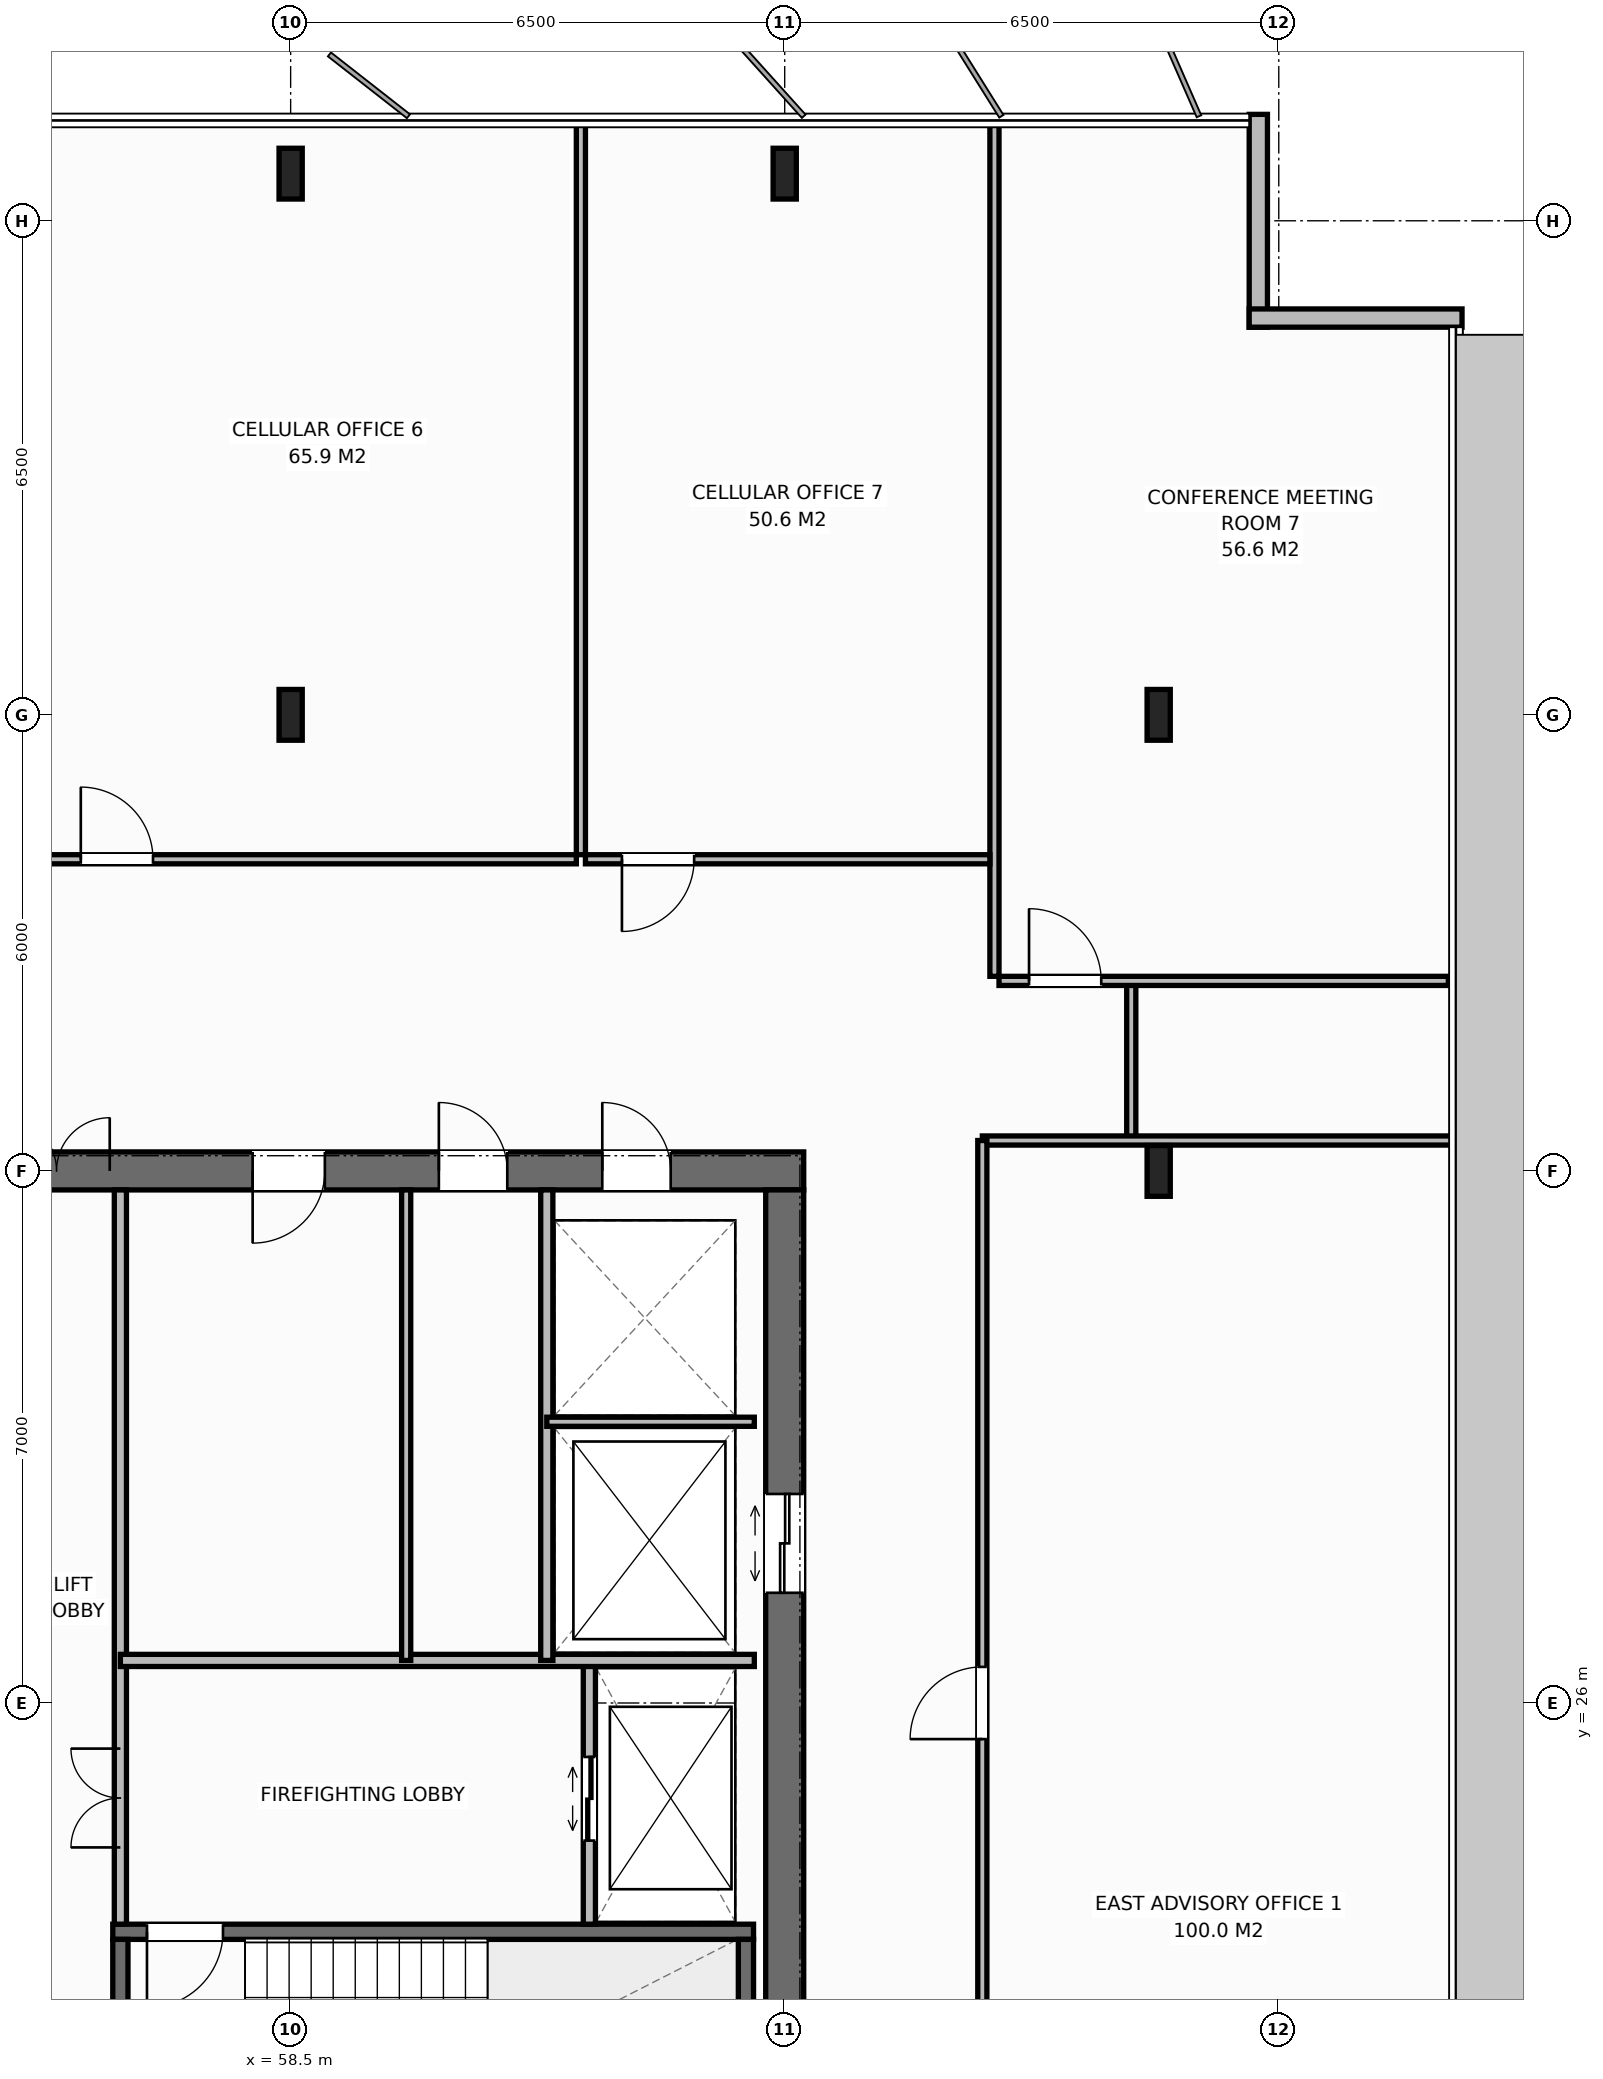
"""IFC4 building model, lengths in metres.
Left out: names, types, materials, properties, quantities, classifications, styles, units other than length and angle.
Written with IfcOpenShell. Run it as: python <this file> out.ifc"""

import sys

from ifc_helpers import new_model, si_unit, direction, frame, frame_2d, origin, origin_2d, place, context, subcontext, project, spatial, rectangle, i_section, extrude, element, fill, save


model = new_model("IFC4")
c1 = context("Model", 3, precision=1e-05, world=origin(), true_north=direction((0.0, 1.0)))
c2 = subcontext(c1, "Body", "Model", "MODEL_VIEW")
j1 = project(units=[si_unit("LENGTHUNIT", "METRE"), si_unit("PLANEANGLEUNIT", "RADIAN")], contexts=[c1])
p1 = place(None, origin())
s1 = spatial("IfcSite", under=j1, at=p1, CompositionType="ELEMENT")
p2 = place(p1, origin())
s2 = spatial("IfcBuilding", under=s1, at=p2, CompositionType="ELEMENT")
p3 = place(p2, frame((0.0, 0.0, 298.4)))
s3 = spatial("IfcBuildingStorey", under=s2, at=p3, CompositionType="ELEMENT", Elevation=298.4)
p4 = place(p3, frame((51.75, 33.0, 0.0), z_axis=(0.0, 0.0, 1.0), x_axis=(1.0, 0.0, 0.0)))
e1 = element("IfcWall", 1, at=p4, inside=s3, PredefinedType="SHEAR", context=c2, shape_type="SweptSolid", body=[
    extrude(rectangle(XDim=13.5, YDim=0.5, at=frame_2d((6.75, 0.0))), origin(), (0.0, 0.0, 1.0), 4.0),
])
p5 = place(p4, frame((2.97, 0.0, 0.0)))
e2 = element("IfcOpeningElement", 2, at=p5, cuts=e1, PredefinedType="OPENING", context=c2, shape_type="SweptSolid", body=[
    extrude(rectangle(XDim=1.4, YDim=2.2, at=frame_2d((0.7, 1.1))), frame((0.0, 0.26, 0.0), z_axis=(0.0, -1.0, 0.0), x_axis=(1.0, 0.0, 0.0)), (0.0, 0.0, 1.0), 0.52),
])
p6 = place(p4, frame((10.85, 0.0, 0.0)))
e3 = element("IfcOpeningElement", 3, at=p6, cuts=e1, PredefinedType="OPENING", context=c2, shape_type="SweptSolid", body=[
    extrude(rectangle(XDim=0.9, YDim=2.15, at=frame_2d((0.45, 1.075))), frame((0.0, 0.26, 0.0), z_axis=(0.0, -1.0, 0.0), x_axis=(1.0, 0.0, 0.0)), (0.0, 0.0, 1.0), 0.52),
])
p7 = place(p4, frame((6.25, 0.0, 0.0)))
e4 = element("IfcOpeningElement", 4, at=p7, cuts=e1, PredefinedType="OPENING", context=c2, shape_type="SweptSolid", body=[
    extrude(rectangle(XDim=0.95, YDim=2.15, at=frame_2d((0.475, 1.075))), frame((0.0, 0.26, 0.0), z_axis=(0.0, -1.0, 0.0), x_axis=(1.0, 0.0, 0.0)), (0.0, 0.0, 1.0), 0.52),
])
p8 = place(p4, frame((8.7, 0.0, 0.0)))
e5 = element("IfcOpeningElement", 5, at=p8, cuts=e1, PredefinedType="OPENING", context=c2, shape_type="SweptSolid", body=[
    extrude(rectangle(XDim=0.9, YDim=2.15, at=frame_2d((0.45, 1.075))), frame((0.0, 0.26, 0.0), z_axis=(0.0, -1.0, 0.0), x_axis=(1.0, 0.0, 0.0)), (0.0, 0.0, 1.0), 0.52),
])
p9 = place(p3, frame((65.0, 19.25, 0.0), z_axis=(0.0, 0.0, 1.0), x_axis=(0.0, 1.0, 0.0)))
e6 = element("IfcWall", 6, at=p9, inside=s3, PredefinedType="SHEAR", context=c2, shape_type="SweptSolid", body=[
    extrude(rectangle(XDim=13.5, YDim=0.5, at=frame_2d((6.75, 0.0))), origin(), (0.0, 0.0, 1.0), 4.0),
])
p10 = place(p9, frame((8.2, 0.0, 0.0)))
e7 = element("IfcOpeningElement", 7, at=p10, cuts=e6, PredefinedType="OPENING", context=c2, shape_type="SweptSolid", body=[
    extrude(rectangle(XDim=1.3, YDim=2.2, at=frame_2d((0.65, 1.1))), frame((0.0, 0.26, 0.0), z_axis=(0.0, -1.0, 0.0), x_axis=(1.0, 0.0, 0.0)), (0.0, 0.0, 1.0), 0.52),
])
p11 = place(p3, frame((56.16, 22.99, 0.0), z_axis=(0.0, 0.0, 1.0), x_axis=(1.0, 0.0, 0.0)))
e8 = element("IfcWall", 8, at=p11, inside=s3, PredefinedType="SHEAR", context=c2, shape_type="SweptSolid", body=[
    extrude(rectangle(XDim=8.43, YDim=0.2, at=frame_2d((4.215, 0.0))), origin(), (0.0, 0.0, 1.0), 4.0),
])
p12 = place(p11, frame((0.45, 0.0, 0.0)))
e9 = element("IfcOpeningElement", 9, at=p12, cuts=e8, PredefinedType="OPENING", context=c2, shape_type="SweptSolid", body=[
    extrude(rectangle(XDim=1.0, YDim=2.15, at=frame_2d((0.5, 1.075))), frame((0.0, 0.11, 0.0), z_axis=(0.0, -1.0, 0.0), x_axis=(1.0, 0.0, 0.0)), (0.0, 0.0, 1.0), 0.22),
])
for number, where, z_axis, x_axis in (
    (10, (56.26, 19.61, 0.0), (0.0, 0.0, 1.0), (0.0, 1.0, 0.0)),
    (11, (64.49, 19.61, 0.0), (0.0, 0.0, 1.0), (0.0, 1.0, 0.0)),
):
    element("IfcWall", number, at=place(p3, frame(where, z_axis=z_axis, x_axis=x_axis)), inside=s3, PredefinedType="SHEAR", context=c2, shape_type="SweptSolid", body=[
        extrude(rectangle(XDim=3.28, YDim=0.2, at=frame_2d((1.64, 0.0))), origin(), (0.0, 0.0, 1.0), 4.0),
    ])
for number, where, z_axis, x_axis in (
    (12, (58.5, 39.0, 0.0), (0.0, 0.0, 1.0), (1.0, 0.0, 0.0)),
    (13, (58.5, 46.12, 0.0), (0.0, 0.0, 1.0), (1.0, 0.0, 0.0)),
    (14, (65.0, 46.12, 0.0), (0.0, 0.0, 1.0), (1.0, 0.0, 0.0)),
    (15, (69.92, 33.0, 0.0), (0.0, 0.0, 1.0), (1.0, 0.0, 0.0)),
    (16, (69.92, 39.0, 0.0), (0.0, 0.0, 1.0), (1.0, 0.0, 0.0)),
):
    element("IfcColumn", number, at=place(p3, frame(where, z_axis=z_axis, x_axis=x_axis)), inside=s3, PredefinedType="COLUMN", context=c2, shape_type="SweptSolid", body=[
        extrude(i_section(OverallWidth=0.305, OverallDepth=0.668, WebThickness=0.021, FlangeThickness=0.04, at=origin_2d()), origin(), (0.0, 0.0, 1.0), 4.0),
    ])
for number, where, z_axis, x_axis in (
    (17, (71.231, 46.9, 0.0), (0.0, 0.0, 1.0), (0.0, -1.0, 0.0)),
    (18, (71.111, 44.22, 0.0), (0.0, 0.0, 1.0), (1.0, 0.0, 0.0)),
):
    element("IfcWall", number, at=place(p3, frame(where, z_axis=z_axis, x_axis=x_axis)), inside=s3, PredefinedType="STANDARD", context=c2, shape_type="SweptSolid", body=[
        extrude(rectangle(XDim=2.8, YDim=0.24, at=frame_2d((1.4, 0.0))), origin(), (0.0, 0.0, 1.0), 3.788),
    ])
p13 = place(p3, frame((56.26, 23.09, 0.0), z_axis=(0.0, 0.0, 1.0), x_axis=(0.0, 1.0, 0.0)))
e19 = element("IfcWall", 19, at=p13, inside=s3, PredefinedType="STANDARD", context=c2, shape_type="SweptSolid", body=[
    extrude(rectangle(XDim=9.66, YDim=0.16, at=frame_2d((4.83, 0.0))), origin(), (0.0, 0.0, 1.0), 3.788),
])
p14 = place(p13, frame((1.01, 0.0, 0.0)))
e20 = element("IfcOpeningElement", 20, at=p14, cuts=e19, PredefinedType="OPENING", context=c2, shape_type="SweptSolid", body=[
    extrude(rectangle(XDim=1.3, YDim=2.2, at=frame_2d((0.65, 1.1))), frame((0.0, 0.09, 0.0), z_axis=(0.0, -1.0, 0.0), x_axis=(1.0, 0.0, 0.0)), (0.0, 0.0, 1.0), 0.18),
])
p15 = place(p3, frame((62.43, 23.09, 0.0), z_axis=(0.0, 0.0, 1.0), x_axis=(0.0, 1.0, 0.0)))
e21 = element("IfcWall", 21, at=p15, inside=s3, PredefinedType="STANDARD", context=c2, shape_type="SweptSolid", body=[
    extrude(rectangle(XDim=3.47, YDim=0.16, at=frame_2d((1.735, 0.0))), origin(), (0.0, 0.0, 1.0), 3.788),
])
p16 = place(p15, frame((1.1, 0.0, 0.0)))
e22 = element("IfcOpeningElement", 22, at=p16, cuts=e21, PredefinedType="OPENING", context=c2, shape_type="SweptSolid", body=[
    extrude(rectangle(XDim=1.1, YDim=2.2, at=frame_2d((0.55, 1.1))), frame((0.0, 0.09, 0.0), z_axis=(0.0, -1.0, 0.0), x_axis=(1.0, 0.0, 0.0)), (0.0, 0.0, 1.0), 0.18),
])
p17 = place(p3, frame((56.26, 26.56, 0.0), z_axis=(0.0, 0.0, 1.0), x_axis=(1.0, 0.0, 0.0)))
e23 = element("IfcWall", 23, at=p17, inside=s3, PredefinedType="STANDARD", context=c2, shape_type="SweptSolid", body=[
    extrude(rectangle(XDim=8.34, YDim=0.16, at=frame_2d((4.17, 0.0))), origin(), (0.0, 0.0, 1.0), 3.788),
])
p18 = place(p3, frame((61.87, 26.56, 0.0), z_axis=(0.0, 0.0, 1.0), x_axis=(0.0, 1.0, 0.0)))
e24 = element("IfcWall", 24, at=p18, inside=s3, PredefinedType="STANDARD", context=c2, shape_type="SweptSolid", body=[
    extrude(rectangle(XDim=6.19, YDim=0.16, at=frame_2d((3.095, 0.0))), origin(), (0.0, 0.0, 1.0), 3.788),
])
p19 = place(p3, frame((61.87, 29.7, 0.0), z_axis=(0.0, 0.0, 1.0), x_axis=(1.0, 0.0, 0.0)))
e25 = element("IfcWall", 25, at=p19, inside=s3, PredefinedType="PARTITIONING", context=c2, shape_type="SweptSolid", body=[
    extrude(rectangle(XDim=2.73, YDim=0.12, at=frame_2d((1.365, 0.0))), origin(), (0.0, 0.0, 1.0), 3.788),
])
p20 = place(p3, frame((60.02, 26.56, 0.0), z_axis=(0.0, 0.0, 1.0), x_axis=(0.0, 1.0, 0.0)))
e26 = element("IfcWall", 26, at=p20, inside=s3, PredefinedType="PARTITIONING", context=c2, shape_type="SweptSolid", body=[
    extrude(rectangle(XDim=6.19, YDim=0.12, at=frame_2d((3.095, 0.0))), origin(), (0.0, 0.0, 1.0), 3.788),
])
p21 = place(p3, frame((69.559, 33.4, 0.0), z_axis=(0.0, 0.0, 1.0), x_axis=(0.0, 1.0, 0.0)))
e27 = element("IfcWall", 27, at=p21, inside=s3, PredefinedType="PARTITIONING", context=c2, shape_type="SweptSolid", body=[
    extrude(rectangle(XDim=2.1, YDim=0.12, at=frame_2d((1.05, 0.0))), origin(), (0.0, 0.0, 1.0), 3.788),
])
p22 = place(p3, frame((62.319, 37.16, 0.0), z_axis=(0.0, 0.0, 1.0), x_axis=(0.0, 1.0, 0.0)))
e28 = element("IfcWall", 28, at=p22, inside=s3, PredefinedType="PARTITIONING", context=c2, shape_type="SweptSolid", body=[
    extrude(rectangle(XDim=9.72, YDim=0.12, at=frame_2d((4.86, 0.0))), origin(), (0.0, 0.0, 1.0), 3.788),
])
p23 = place(p3, frame((55.259, 37.1, 0.0), z_axis=(0.0, 0.0, 1.0), x_axis=(1.0, 0.0, 0.0)))
e29 = element("IfcWall", 29, at=p23, inside=s3, PredefinedType="PARTITIONING", context=c2, shape_type="SweptSolid", body=[
    extrude(rectangle(XDim=6.999, YDim=0.12, at=frame_2d((3.5, 0.0))), origin(), (0.0, 0.0, 1.0), 3.788),
])
p24 = place(p23, frame((0.48, 0.0, 0.0)))
e30 = element("IfcOpeningElement", 30, at=p24, cuts=e29, PredefinedType="OPENING", context=c2, shape_type="SweptSolid", body=[
    extrude(rectangle(XDim=0.95, YDim=2.15, at=frame_2d((0.475, 1.075))), frame((0.0, 0.07, 0.0), z_axis=(0.0, -1.0, 0.0), x_axis=(1.0, 0.0, 0.0)), (0.0, 0.0, 1.0), 0.14),
])
p25 = place(p3, frame((67.76, 35.56, 0.0), z_axis=(0.0, 0.0, 1.0), x_axis=(0.0, 1.0, 0.0)))
e31 = element("IfcWall", 31, at=p25, inside=s3, PredefinedType="PARTITIONING", context=c2, shape_type="SweptSolid", body=[
    extrude(rectangle(XDim=11.32, YDim=0.12, at=frame_2d((5.66, 0.0))), origin(), (0.0, 0.0, 1.0), 3.788),
])
p26 = place(p3, frame((62.379, 37.1, 0.0), z_axis=(0.0, 0.0, 1.0), x_axis=(1.0, 0.0, 0.0)))
e32 = element("IfcWall", 32, at=p26, inside=s3, PredefinedType="PARTITIONING", context=c2, shape_type="SweptSolid", body=[
    extrude(rectangle(XDim=5.321, YDim=0.12, at=frame_2d((2.66, 0.0))), origin(), (0.0, 0.0, 1.0), 3.788),
])
p27 = place(p26, frame((0.48, 0.0, 0.0)))
e33 = element("IfcOpeningElement", 33, at=p27, cuts=e32, PredefinedType="OPENING", context=c2, shape_type="SweptSolid", body=[
    extrude(rectangle(XDim=0.95, YDim=2.15, at=frame_2d((0.475, 1.075))), frame((0.0, 0.07, 0.0), z_axis=(0.0, -1.0, 0.0), x_axis=(1.0, 0.0, 0.0)), (0.0, 0.0, 1.0), 0.14),
])
p28 = place(p3, frame((67.819, 35.5, 0.0), z_axis=(0.0, 0.0, 1.0), x_axis=(1.0, 0.0, 0.0)))
e34 = element("IfcWall", 34, at=p28, inside=s3, PredefinedType="PARTITIONING", context=c2, shape_type="SweptSolid", body=[
    extrude(rectangle(XDim=5.912, YDim=0.12, at=frame_2d((2.956, 0.0))), origin(), (0.0, 0.0, 1.0), 3.788),
])
p29 = place(p28, frame((0.395, 0.0, 0.0)))
e35 = element("IfcOpeningElement", 35, at=p29, cuts=e34, PredefinedType="OPENING", context=c2, shape_type="SweptSolid", body=[
    extrude(rectangle(XDim=0.95, YDim=2.15, at=frame_2d((0.475, 1.075))), frame((0.0, 0.07, 0.0), z_axis=(0.0, -1.0, 0.0), x_axis=(1.0, 0.0, 0.0)), (0.0, 0.0, 1.0), 0.14),
])
p30 = place(p3, frame((67.6, 33.4, 0.0), z_axis=(0.0, 0.0, 1.0), x_axis=(1.0, 0.0, 0.0)))
e36 = element("IfcWall", 36, at=p30, inside=s3, PredefinedType="PARTITIONING", context=c2, shape_type="SweptSolid", body=[
    extrude(rectangle(XDim=6.291, YDim=0.12, at=frame_2d((3.146, 0.0))), origin(), (0.0, 0.0, 1.0), 3.788),
])
p31 = place(p3, frame((67.6, 16.5, 0.0), z_axis=(0.0, 0.0, 1.0), x_axis=(0.0, 1.0, 0.0)))
e37 = element("IfcWall", 37, at=p31, inside=s3, PredefinedType="PARTITIONING", context=c2, shape_type="SweptSolid", body=[
    extrude(rectangle(XDim=16.9, YDim=0.12, at=frame_2d((8.45, 0.0))), origin(), (0.0, 0.0, 1.0), 3.788),
])
p32 = place(p31, frame((9.025, 0.0, 0.0)))
e38 = element("IfcOpeningElement", 38, at=p32, cuts=e37, PredefinedType="OPENING", context=c2, shape_type="SweptSolid", body=[
    extrude(rectangle(XDim=0.95, YDim=2.15, at=frame_2d((0.475, 1.075))), frame((0.0, 0.07, 0.0), z_axis=(0.0, -1.0, 0.0), x_axis=(1.0, 0.0, 0.0)), (0.0, 0.0, 1.0), 0.14),
])
p33 = place(p5, origin())
e39 = element("IfcDoor", 39, at=p33, inside=s3, OperationType="DOUBLE_DOOR_SINGLE_SWING", PredefinedType="DOOR", context=c2, shape_type="SweptSolid", body=[
    extrude(rectangle(XDim=1.4, YDim=2.2, at=frame_2d((0.7, 1.1))), frame((0.0, -0.025, 0.0), z_axis=(0.0, -1.0, 0.0), x_axis=(1.0, 0.0, 0.0)), (0.0, 0.0, 1.0), 0.05),
])
fill(e2, e39)
p34 = place(p12, origin())
e40 = element("IfcDoor", 40, at=p34, inside=s3, OperationType="SINGLE_SWING_RIGHT", PredefinedType="DOOR", context=c2, shape_type="SweptSolid", body=[
    extrude(rectangle(XDim=1.0, YDim=2.15, at=frame_2d((0.5, 1.075))), frame((0.0, 0.025, 0.0), z_axis=(0.0, -1.0, 0.0), x_axis=(1.0, 0.0, 0.0)), (0.0, 0.0, 1.0), 0.05),
])
fill(e9, e40)
p35 = place(p16, origin())
e41 = element("IfcDoor", 41, at=p35, inside=s3, OperationType="DOUBLE_DOOR_SLIDING", PredefinedType="DOOR", context=c2, shape_type="SweptSolid", body=[
    extrude(rectangle(XDim=1.1, YDim=2.2, at=frame_2d((0.55, 1.1))), frame((0.0, 0.025, 0.0), z_axis=(0.0, -1.0, 0.0), x_axis=(1.0, 0.0, 0.0)), (0.0, 0.0, 1.0), 0.05),
])
fill(e22, e41)
p36 = place(p14, origin())
e42 = element("IfcDoor", 42, at=p36, inside=s3, OperationType="DOUBLE_DOOR_SINGLE_SWING", PredefinedType="DOOR", context=c2, shape_type="SweptSolid", body=[
    extrude(rectangle(XDim=1.3, YDim=2.2, at=frame_2d((0.65, 1.1))), frame((0.0, 0.025, 0.0), z_axis=(0.0, -1.0, 0.0), x_axis=(1.0, 0.0, 0.0)), (0.0, 0.0, 1.0), 0.05),
])
fill(e20, e42)
p37 = place(p10, origin())
e43 = element("IfcDoor", 43, at=p37, inside=s3, OperationType="DOUBLE_DOOR_SLIDING", PredefinedType="DOOR", context=c2, shape_type="SweptSolid", body=[
    extrude(rectangle(XDim=1.3, YDim=2.2, at=frame_2d((0.65, 1.1))), frame((0.0, 0.025, 0.0), z_axis=(0.0, -1.0, 0.0), x_axis=(1.0, 0.0, 0.0)), (0.0, 0.0, 1.0), 0.05),
])
fill(e7, e43)
p38 = place(p6, origin())
e44 = element("IfcDoor", 44, at=p38, inside=s3, OperationType="SINGLE_SWING_LEFT", PredefinedType="DOOR", context=c2, shape_type="SweptSolid", body=[
    extrude(rectangle(XDim=0.9, YDim=2.15, at=frame_2d((0.45, 1.075))), frame((0.0, -0.025, 0.0), z_axis=(0.0, -1.0, 0.0), x_axis=(1.0, 0.0, 0.0)), (0.0, 0.0, 1.0), 0.05),
])
fill(e3, e44)
p39 = place(p7, origin())
e45 = element("IfcDoor", 45, at=p39, inside=s3, OperationType="SINGLE_SWING_RIGHT", PredefinedType="DOOR", context=c2, shape_type="SweptSolid", body=[
    extrude(rectangle(XDim=0.95, YDim=2.15, at=frame_2d((0.475, 1.075))), frame((0.0, -0.025, 0.0), z_axis=(0.0, -1.0, 0.0), x_axis=(1.0, 0.0, 0.0)), (0.0, 0.0, 1.0), 0.05),
])
fill(e4, e45)
p40 = place(p8, origin())
e46 = element("IfcDoor", 46, at=p40, inside=s3, OperationType="SINGLE_SWING_LEFT", PredefinedType="DOOR", context=c2, shape_type="SweptSolid", body=[
    extrude(rectangle(XDim=0.9, YDim=2.15, at=frame_2d((0.45, 1.075))), frame((0.0, -0.025, 0.0), z_axis=(0.0, -1.0, 0.0), x_axis=(1.0, 0.0, 0.0)), (0.0, 0.0, 1.0), 0.05),
])
fill(e5, e46)
p41 = place(p24, origin())
e47 = element("IfcDoor", 47, at=p41, inside=s3, OperationType="SINGLE_SWING_LEFT", PredefinedType="DOOR", context=c2, shape_type="SweptSolid", body=[
    extrude(rectangle(XDim=0.95, YDim=2.15, at=frame_2d((0.475, 1.075))), frame((0.0, 0.025, 0.0), z_axis=(0.0, -1.0, 0.0), x_axis=(1.0, 0.0, 0.0)), (0.0, 0.0, 1.0), 0.05),
])
fill(e30, e47)
p42 = place(p27, origin())
e48 = element("IfcDoor", 48, at=p42, inside=s3, OperationType="SINGLE_SWING_RIGHT", PredefinedType="DOOR", context=c2, shape_type="SweptSolid", body=[
    extrude(rectangle(XDim=0.95, YDim=2.15, at=frame_2d((0.475, 1.075))), frame((0.0, 0.025, 0.0), z_axis=(0.0, -1.0, 0.0), x_axis=(1.0, 0.0, 0.0)), (0.0, 0.0, 1.0), 0.05),
])
fill(e33, e48)
p43 = place(p29, origin())
e49 = element("IfcDoor", 49, at=p43, inside=s3, OperationType="SINGLE_SWING_LEFT", PredefinedType="DOOR", context=c2, shape_type="SweptSolid", body=[
    extrude(rectangle(XDim=0.95, YDim=2.15, at=frame_2d((0.475, 1.075))), frame((0.0, 0.025, 0.0), z_axis=(0.0, -1.0, 0.0), x_axis=(1.0, 0.0, 0.0)), (0.0, 0.0, 1.0), 0.05),
])
fill(e35, e49)
p44 = place(p32, origin())
e50 = element("IfcDoor", 50, at=p44, inside=s3, OperationType="SINGLE_SWING_LEFT", PredefinedType="DOOR", context=c2, shape_type="SweptSolid", body=[
    extrude(rectangle(XDim=0.95, YDim=2.15, at=frame_2d((0.475, 1.075))), frame((0.0, 0.025, 0.0), z_axis=(0.0, -1.0, 0.0), x_axis=(1.0, 0.0, 0.0)), (0.0, 0.0, 1.0), 0.05),
])
fill(e38, e50)
save(model, sys.argv[1])
